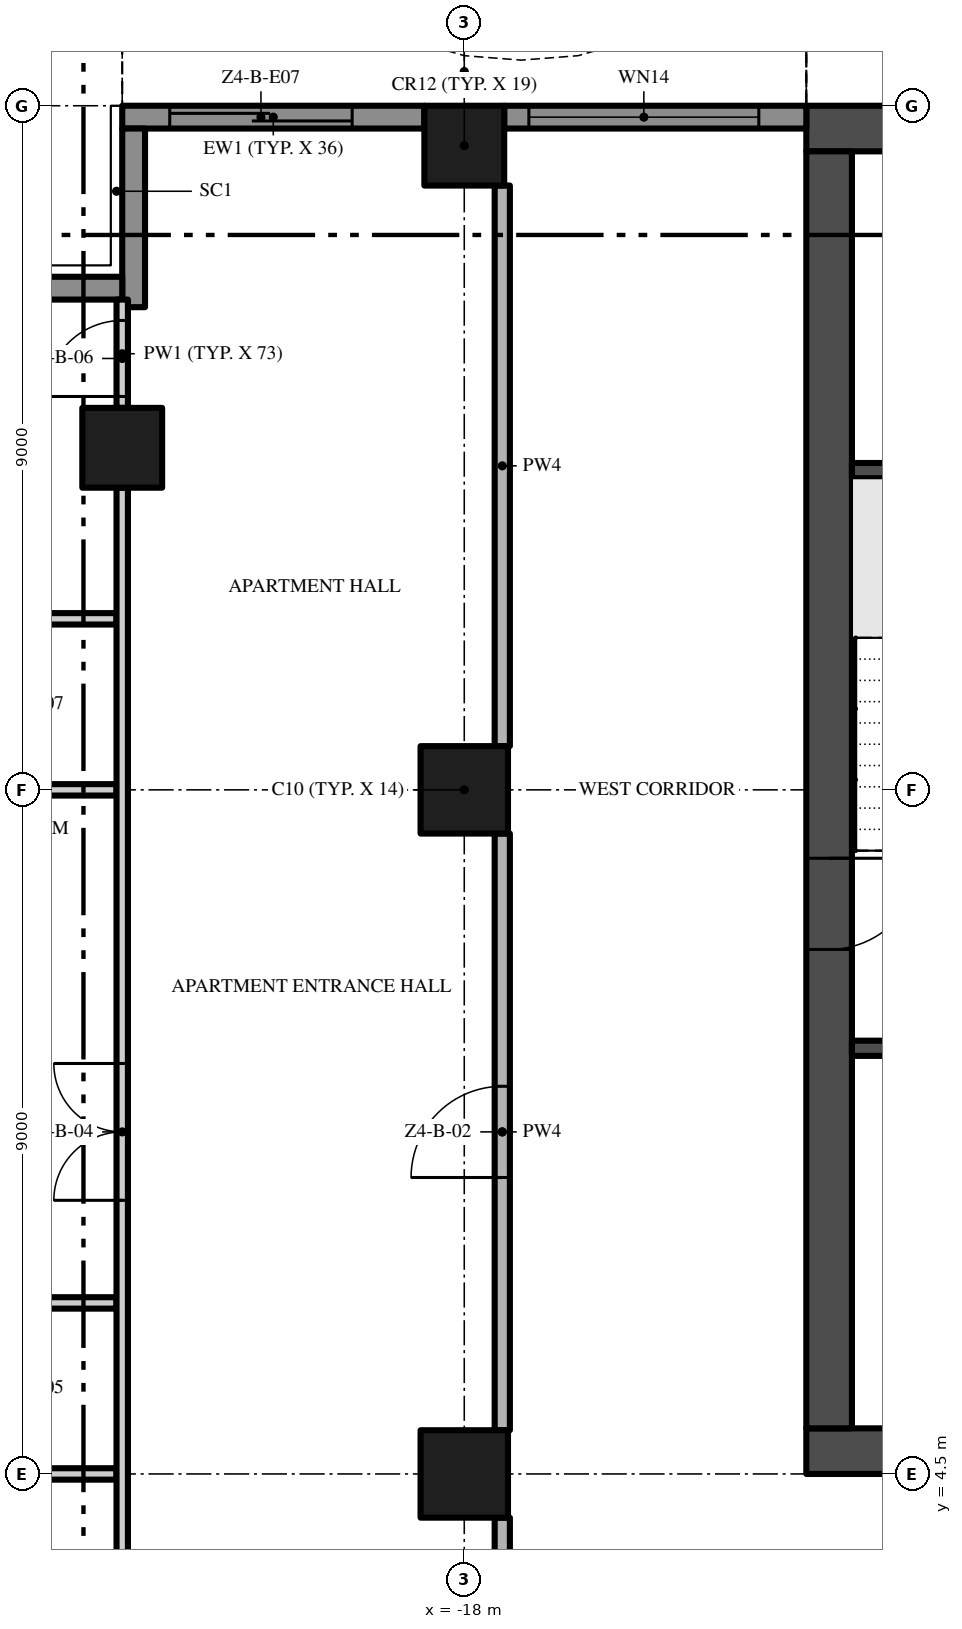
"""IFC4 building model, lengths in metres.
Left out: names, types, materials, properties, quantities, classifications, styles, units other than length and angle.
Written with IfcOpenShell. Run it as: python <this file> out.ifc"""

import sys

from ifc_helpers import new_model, si_unit, direction, frame, frame_2d, origin, origin_2d, place, context, subcontext, project, spatial, polyline, rectangle, outline, extrude, element, fill, save


model = new_model("IFC4")
c1 = context("Model", 3, precision=1e-05, world=origin(), true_north=direction((0.0, 1.0)))
c2 = subcontext(c1, "Body", "Model", "MODEL_VIEW")
j1 = project(units=[si_unit("LENGTHUNIT", "METRE"), si_unit("PLANEANGLEUNIT", "RADIAN")], contexts=[c1])
p1 = place(None, origin())
s1 = spatial("IfcSite", under=j1, at=p1, CompositionType="ELEMENT")
p2 = place(p1, origin())
s2 = spatial("IfcBuilding", under=s1, at=p2, CompositionType="ELEMENT")
p3 = place(p2, frame((0.0, 0.0, 195.8)))
s3 = spatial("IfcBuildingStorey", under=s2, at=p3, CompositionType="ELEMENT", Elevation=195.8)
p4 = place(p3, frame((-13.5, 4.8, -0.3), z_axis=(0.0, 0.0, 1.0), x_axis=(1.0, 0.0, 0.0)))
e1 = element("IfcWall", 1, at=p4, inside=s3, PredefinedType="SHEAR", context=c2, shape_type="SweptSolid", body=[
    extrude(rectangle(XDim=27.0, YDim=0.6, at=frame_2d((13.5, 0.0))), origin(), (0.0, 0.0, 1.0), 3.8),
])
p5 = place(p4, frame((12.0, 0.0, 0.3)))
e2 = element("IfcOpeningElement", 2, at=p5, cuts=e1, PredefinedType="OPENING", context=c2, shape_type="SweptSolid", body=[
    extrude(rectangle(XDim=3.0, YDim=2.4, at=frame_2d((1.5, 1.2))), frame((0.0, 0.31, 0.0), z_axis=(0.0, -1.0, 0.0), x_axis=(1.0, 0.0, 0.0)), (0.0, 0.0, 1.0), 0.62),
])
p6 = place(p4, frame((4.9, 0.0, 0.3)))
e3 = element("IfcOpeningElement", 3, at=p6, cuts=e1, PredefinedType="OPENING", context=c2, shape_type="SweptSolid", body=[
    extrude(rectangle(XDim=1.2, YDim=2.2, at=frame_2d((0.6, 1.1))), frame((0.0, 0.31, 0.0), z_axis=(0.0, -1.0, 0.0), x_axis=(1.0, 0.0, 0.0)), (0.0, 0.0, 1.0), 0.62),
])
p7 = place(p4, frame((20.75, 0.0, 0.3)))
e4 = element("IfcOpeningElement", 4, at=p7, cuts=e1, PredefinedType="OPENING", context=c2, shape_type="SweptSolid", body=[
    extrude(rectangle(XDim=1.5, YDim=2.2, at=frame_2d((0.75, 1.1))), frame((0.0, 0.31, 0.0), z_axis=(0.0, -1.0, 0.0), x_axis=(1.0, 0.0, 0.0)), (0.0, 0.0, 1.0), 0.62),
])
p8 = place(p4, frame((17.4, 0.0, 0.3)))
e5 = element("IfcOpeningElement", 5, at=p8, cuts=e1, PredefinedType="OPENING", context=c2, shape_type="SweptSolid", body=[
    extrude(rectangle(XDim=1.2, YDim=2.2, at=frame_2d((0.6, 1.1))), frame((0.0, 0.31, 0.0), z_axis=(0.0, -1.0, 0.0), x_axis=(1.0, 0.0, 0.0)), (0.0, 0.0, 1.0), 0.62),
])
p9 = place(p3, frame((13.5, 22.2, -0.3), z_axis=(0.0, 0.0, 1.0), x_axis=(-1.0, 0.0, 0.0)))
e6 = element("IfcWall", 6, at=p9, inside=s3, PredefinedType="SHEAR", context=c2, shape_type="SweptSolid", body=[
    extrude(rectangle(XDim=27.0, YDim=0.6, at=frame_2d((13.5, 0.0))), origin(), (0.0, 0.0, 1.0), 3.8),
])
p10 = place(p3, frame((-13.2, 21.9, -0.3), z_axis=(0.0, 0.0, 1.0), x_axis=(0.0, -1.0, 0.0)))
e7 = element("IfcWall", 7, at=p10, inside=s3, PredefinedType="SHEAR", context=c2, shape_type="SweptSolid", body=[
    extrude(rectangle(XDim=16.8, YDim=0.6, at=frame_2d((8.4, 0.0))), origin(), (0.0, 0.0, 1.0), 3.8),
])
p11 = place(p10, frame((9.3, 0.0, 0.3)))
e8 = element("IfcOpeningElement", 8, at=p11, cuts=e7, PredefinedType="OPENING", context=c2, shape_type="SweptSolid", body=[
    extrude(rectangle(XDim=1.2, YDim=2.2, at=frame_2d((0.6, 1.1))), frame((0.0, 0.31, 0.0), z_axis=(0.0, -1.0, 0.0), x_axis=(1.0, 0.0, 0.0)), (0.0, 0.0, 1.0), 0.62),
])
p12 = place(p3, frame((-18.0, 13.5, 0.0), z_axis=(0.0, 0.0, 1.0), x_axis=(1.0, 0.0, 0.0)))
e9 = element("IfcColumn", 9, at=p12, inside=s3, PredefinedType="COLUMN", context=c2, shape_type="SweptSolid", body=[
    extrude(rectangle(XDim=1.15, YDim=1.15, at=origin_2d()), origin(), (0.0, 0.0, 1.0), 3.5),
])
p13 = place(p3, frame((-18.0, 21.975, 0.0), z_axis=(0.0, 0.0, 1.0), x_axis=(1.0, 0.0, 0.0)))
e10 = element("IfcColumn", 10, at=p13, inside=s3, PredefinedType="COLUMN", context=c2, shape_type="SweptSolid", body=[
    extrude(rectangle(XDim=1.05, YDim=1.05, at=origin_2d()), origin(), (0.0, 0.0, 1.0), 3.5),
])
p14 = place(p3, frame((-18.0, 4.5, 0.0), z_axis=(0.0, 0.0, 1.0), x_axis=(1.0, 0.0, 0.0)))
e11 = element("IfcColumn", 11, at=p14, inside=s3, PredefinedType="COLUMN", context=c2, shape_type="SweptSolid", body=[
    extrude(rectangle(XDim=1.15, YDim=1.15, at=origin_2d()), origin(), (0.0, 0.0, 1.0), 3.5),
])
p15 = place(p3, frame((-22.5, 18.0, 0.0), z_axis=(0.0, 0.0, 1.0), x_axis=(1.0, 0.0, 0.0)))
e12 = element("IfcColumn", 12, at=p15, inside=s3, PredefinedType="COLUMN", context=c2, shape_type="SweptSolid", body=[
    extrude(rectangle(XDim=1.05, YDim=1.05, at=origin_2d()), origin(), (0.0, 0.0, 1.0), 3.5),
])
p16 = place(p3, frame((-17.475, 22.35, 0.0), z_axis=(0.0, 0.0, 1.0), x_axis=(1.0, 0.0, 0.0)))
e13 = element("IfcWall", 13, at=p16, inside=s3, PredefinedType="SOLIDWALL", context=c2, shape_type="SweptSolid", body=[
    extrude(rectangle(XDim=3.975, YDim=0.3, at=frame_2d((1.988, 0.0))), origin(), (0.0, 0.0, 1.0), 3.5),
])
p17 = place(p16, frame((0.325, 0.0, 0.45)))
e14 = element("IfcOpeningElement", 14, at=p17, cuts=e13, PredefinedType="OPENING", context=c2, shape_type="SweptSolid", body=[
    extrude(rectangle(XDim=3.025, YDim=2.65, at=frame_2d((1.512, 1.325))), frame((0.0, 0.16, 0.0), z_axis=(0.0, -1.0, 0.0), x_axis=(1.0, 0.0, 0.0)), (0.0, 0.0, 1.0), 0.32),
])
p18 = place(p3, frame((-22.5, 22.35, 0.0), z_axis=(0.0, 0.0, 1.0), x_axis=(1.0, 0.0, 0.0)))
e15 = element("IfcWall", 15, at=p18, inside=s3, PredefinedType="SOLIDWALL", context=c2, shape_type="SweptSolid", body=[
    extrude(rectangle(XDim=3.975, YDim=0.3, at=frame_2d((1.988, 0.0))), origin(), (0.0, 0.0, 1.0), 3.5),
])
p19 = place(p18, frame((0.625, 0.0, 0.0)))
e16 = element("IfcOpeningElement", 16, at=p19, cuts=e15, PredefinedType="OPENING", context=c2, shape_type="SweptSolid", body=[
    extrude(rectangle(XDim=2.4, YDim=2.4, at=frame_2d((1.2, 1.2))), frame((0.0, 0.16, 0.0), z_axis=(0.0, -1.0, 0.0), x_axis=(1.0, 0.0, 0.0)), (0.0, 0.0, 1.0), 0.32),
])
p20 = place(p3, frame((-22.35, 19.85, 0.0), z_axis=(0.0, 0.0, 1.0), x_axis=(0.0, 1.0, 0.0)))
e17 = element("IfcWall", 17, at=p20, inside=s3, PredefinedType="SOLIDWALL", context=c2, shape_type="SweptSolid", body=[
    extrude(rectangle(XDim=2.35, YDim=0.3, at=frame_2d((1.175, 0.0))), origin(), (0.0, 0.0, 1.0), 3.5),
])
p21 = place(p3, frame((-24.75, 20.1, 0.0), z_axis=(0.0, 0.0, 1.0), x_axis=(1.0, 0.0, 0.0)))
e18 = element("IfcWall", 18, at=p21, inside=s3, PredefinedType="SOLIDWALL", context=c2, shape_type="SweptSolid", body=[
    extrude(rectangle(XDim=2.25, YDim=0.3, at=frame_2d((1.125, 0.0))), origin(), (0.0, 0.0, 1.0), 3.5),
])
p22 = place(p3, origin())
e19 = element("IfcWall", 19, at=p22, inside=s3, PredefinedType="USERDEFINED", context=c2, shape_type="SweptSolid", body=[
    extrude(outline(polyline([(-13.5, 24.3), (-15.0, 23.595), (-16.5, 23.159), (-17.25, 23.1), (-18.0, 23.159), (-19.5, 23.595), (-21.0, 24.3), (-22.5, 25.005), (-22.606, 24.779), (-21.106, 24.074), (-19.589, 23.36), (-18.045, 22.911), (-17.25, 22.849), (-16.455, 22.911), (-14.911, 23.36), (-13.394, 24.074), (-13.5, 24.3)])), origin(), (0.0, 0.0, 1.0), 0.9),
])
for number, where, z_axis, x_axis in (
    (20, (-12.9, 10.1, 0.0), (0.0, 0.0, 1.0), (1.0, 0.0, 0.0)),
    (21, (-12.9, 17.7, 0.0), (0.0, 0.0, 1.0), (1.0, 0.0, 0.0)),
):
    element("IfcWall", number, at=place(p3, frame(where, z_axis=z_axis, x_axis=x_axis)), inside=s3, PredefinedType="SHEAR", context=c2, shape_type="SweptSolid", body=[
        extrude(rectangle(XDim=3.25, YDim=0.2, at=frame_2d((1.625, 0.0))), origin(), (0.0, 0.0, 1.0), 3.5),
    ])
p23 = place(p3, frame((-25.95, 4.5, 0.0), z_axis=(0.0, 0.0, 1.0), x_axis=(1.0, 0.0, 0.0)))
e22 = element("IfcWall", 22, at=p23, inside=s3, PredefinedType="PARTITIONING", context=c2, shape_type="SweptSolid", body=[
    extrude(rectangle(XDim=3.375, YDim=0.15, at=frame_2d((1.688, 0.0))), origin(), (0.0, 0.0, 1.0), 3.5),
])
p24 = place(p3, frame((-24.45, 6.75, 0.0), z_axis=(0.0, 0.0, 1.0), x_axis=(1.0, 0.0, 0.0)))
e23 = element("IfcWall", 23, at=p24, inside=s3, PredefinedType="PARTITIONING", context=c2, shape_type="SweptSolid", body=[
    extrude(rectangle(XDim=1.875, YDim=0.15, at=frame_2d((0.938, 0.0))), origin(), (0.0, 0.0, 1.0), 3.5),
])
p25 = place(p3, frame((-25.95, 13.5, 0.0), z_axis=(0.0, 0.0, 1.0), x_axis=(1.0, 0.0, 0.0)))
e24 = element("IfcWall", 24, at=p25, inside=s3, PredefinedType="PARTITIONING", context=c2, shape_type="SweptSolid", body=[
    extrude(rectangle(XDim=3.375, YDim=0.15, at=frame_2d((1.688, 0.0))), origin(), (0.0, 0.0, 1.0), 3.5),
])
p26 = place(p3, frame((-24.45, 15.75, 0.0), z_axis=(0.0, 0.0, 1.0), x_axis=(1.0, 0.0, 0.0)))
e25 = element("IfcWall", 25, at=p26, inside=s3, PredefinedType="PARTITIONING", context=c2, shape_type="SweptSolid", body=[
    extrude(rectangle(XDim=1.875, YDim=0.15, at=frame_2d((0.938, 0.0))), origin(), (0.0, 0.0, 1.0), 3.5),
])
p27 = place(p3, frame((-22.5, 0.1, 0.0), z_axis=(0.0, 0.0, 1.0), x_axis=(0.0, 1.0, 0.0)))
e26 = element("IfcWall", 26, at=p27, inside=s3, PredefinedType="PARTITIONING", context=c2, shape_type="SweptSolid", body=[
    extrude(rectangle(XDim=17.375, YDim=0.15, at=frame_2d((8.688, 0.0))), origin(), (0.0, 0.0, 1.0), 3.5),
])
p28 = place(p27, frame((1.65, 0.0, 0.0)))
e27 = element("IfcOpeningElement", 27, at=p28, cuts=e26, PredefinedType="OPENING", context=c2, shape_type="SweptSolid", body=[
    extrude(rectangle(XDim=1.0, YDim=2.4, at=frame_2d((0.5, 1.2))), frame((0.0, 0.085, 0.0), z_axis=(0.0, -1.0, 0.0), x_axis=(1.0, 0.0, 0.0)), (0.0, 0.0, 1.0), 0.17),
])
p29 = place(p27, frame((8.0, 0.0, 0.0)))
e28 = element("IfcOpeningElement", 28, at=p29, cuts=e26, PredefinedType="OPENING", context=c2, shape_type="SweptSolid", body=[
    extrude(rectangle(XDim=1.8, YDim=2.4, at=frame_2d((0.9, 1.2))), frame((0.0, 0.085, 0.0), z_axis=(0.0, -1.0, 0.0), x_axis=(1.0, 0.0, 0.0)), (0.0, 0.0, 1.0), 0.17),
])
p30 = place(p3, frame((-22.5, 18.525, 0.0), z_axis=(0.0, 0.0, 1.0), x_axis=(0.0, 1.0, 0.0)))
e29 = element("IfcWall", 29, at=p30, inside=s3, PredefinedType="PARTITIONING", context=c2, shape_type="SweptSolid", body=[
    extrude(rectangle(XDim=1.425, YDim=0.15, at=frame_2d((0.713, 0.0))), origin(), (0.0, 0.0, 1.0), 3.5),
])
p31 = place(p30, frame((0.15, 0.0, 0.0)))
e30 = element("IfcOpeningElement", 30, at=p31, cuts=e29, PredefinedType="OPENING", context=c2, shape_type="SweptSolid", body=[
    extrude(rectangle(XDim=1.0, YDim=2.4, at=frame_2d((0.5, 1.2))), frame((0.0, 0.085, 0.0), z_axis=(0.0, -1.0, 0.0), x_axis=(1.0, 0.0, 0.0)), (0.0, 0.0, 1.0), 0.17),
])
p32 = place(p3, frame((-17.5, -0.2, 0.0), z_axis=(0.0, 0.0, 1.0), x_axis=(0.0, 1.0, 0.0)))
e31 = element("IfcWall", 31, at=p32, inside=s3, PredefinedType="PARTITIONING", context=c2, shape_type="SweptSolid", body=[
    extrude(rectangle(XDim=4.125, YDim=0.2, at=frame_2d((2.062, 0.0))), origin(), (0.0, 0.0, 1.0), 3.5),
])
p33 = place(p3, frame((-17.5, 5.075, 0.0), z_axis=(0.0, 0.0, 1.0), x_axis=(0.0, 1.0, 0.0)))
e32 = element("IfcWall", 32, at=p33, inside=s3, PredefinedType="PARTITIONING", context=c2, shape_type="SweptSolid", body=[
    extrude(rectangle(XDim=7.85, YDim=0.2, at=frame_2d((3.925, 0.0))), origin(), (0.0, 0.0, 1.0), 3.5),
])
p34 = place(p33, frame((3.325, 0.0, 0.0)))
e33 = element("IfcOpeningElement", 33, at=p34, cuts=e32, PredefinedType="OPENING", context=c2, shape_type="SweptSolid", body=[
    extrude(rectangle(XDim=1.2, YDim=2.4, at=frame_2d((0.6, 1.2))), frame((0.0, 0.11, 0.0), z_axis=(0.0, -1.0, 0.0), x_axis=(1.0, 0.0, 0.0)), (0.0, 0.0, 1.0), 0.22),
])
p35 = place(p3, frame((-17.5, 14.075, 0.0), z_axis=(0.0, 0.0, 1.0), x_axis=(0.0, 1.0, 0.0)))
e34 = element("IfcWall", 34, at=p35, inside=s3, PredefinedType="PARTITIONING", context=c2, shape_type="SweptSolid", body=[
    extrude(rectangle(XDim=7.375, YDim=0.2, at=frame_2d((3.688, 0.0))), origin(), (0.0, 0.0, 1.0), 3.5),
])
p36 = place(p17, origin())
e35 = element("IfcWindow", 35, at=p36, inside=s3, PartitioningType="SINGLE_PANEL", PredefinedType="WINDOW", context=c2, shape_type="SweptSolid", body=[
    extrude(rectangle(XDim=3.025, YDim=2.65, at=frame_2d((1.512, 1.325))), frame((0.0, 0.03, 0.0), z_axis=(0.0, -1.0, 0.0), x_axis=(1.0, 0.0, 0.0)), (0.0, 0.0, 1.0), 0.06),
])
fill(e14, e35)
p37 = place(p19, origin())
e36 = element("IfcDoor", 36, at=p37, inside=s3, OperationType="SINGLE_SWING_LEFT", PredefinedType="DOOR", context=c2, shape_type="SweptSolid", body=[
    extrude(rectangle(XDim=2.4, YDim=2.4, at=frame_2d((1.2, 1.2))), frame((0.0, 0.025, 0.0), z_axis=(0.0, -1.0, 0.0), x_axis=(1.0, 0.0, 0.0)), (0.0, 0.0, 1.0), 0.05),
])
fill(e16, e36)
p38 = place(p11, frame((1.2, 0.0, 0.0), z_axis=(0.0, 0.0, 1.0), x_axis=(-1.0, 0.0, 0.0)))
e37 = element("IfcDoor", 37, at=p38, inside=s3, OperationType="SINGLE_SWING_RIGHT", PredefinedType="DOOR", context=c2, shape_type="SweptSolid", body=[
    extrude(rectangle(XDim=1.2, YDim=2.2, at=frame_2d((0.6, 1.1))), frame((0.0, 0.025, 0.0), z_axis=(0.0, -1.0, 0.0), x_axis=(1.0, 0.0, 0.0)), (0.0, 0.0, 1.0), 0.05),
])
fill(e8, e37)
p39 = place(p34, origin())
e38 = element("IfcDoor", 38, at=p39, inside=s3, OperationType="SINGLE_SWING_LEFT", PredefinedType="DOOR", context=c2, shape_type="SweptSolid", body=[
    extrude(rectangle(XDim=1.2, YDim=2.4, at=frame_2d((0.6, 1.2))), frame((0.0, 0.025, 0.0), z_axis=(0.0, -1.0, 0.0), x_axis=(1.0, 0.0, 0.0)), (0.0, 0.0, 1.0), 0.05),
])
fill(e33, e38)
p40 = place(p29, origin())
e39 = element("IfcDoor", 39, at=p40, inside=s3, OperationType="DOUBLE_DOOR_SINGLE_SWING", PredefinedType="DOOR", context=c2, shape_type="SweptSolid", body=[
    extrude(rectangle(XDim=1.8, YDim=2.4, at=frame_2d((0.9, 1.2))), frame((0.0, 0.025, 0.0), z_axis=(0.0, -1.0, 0.0), x_axis=(1.0, 0.0, 0.0)), (0.0, 0.0, 1.0), 0.05),
])
fill(e28, e39)
p41 = place(p31, origin())
e40 = element("IfcDoor", 40, at=p41, inside=s3, OperationType="SINGLE_SWING_LEFT", PredefinedType="DOOR", context=c2, shape_type="SweptSolid", body=[
    extrude(rectangle(XDim=1.0, YDim=2.4, at=frame_2d((0.5, 1.2))), frame((0.0, 0.025, 0.0), z_axis=(0.0, -1.0, 0.0), x_axis=(1.0, 0.0, 0.0)), (0.0, 0.0, 1.0), 0.05),
])
fill(e30, e40)
save(model, sys.argv[1])
